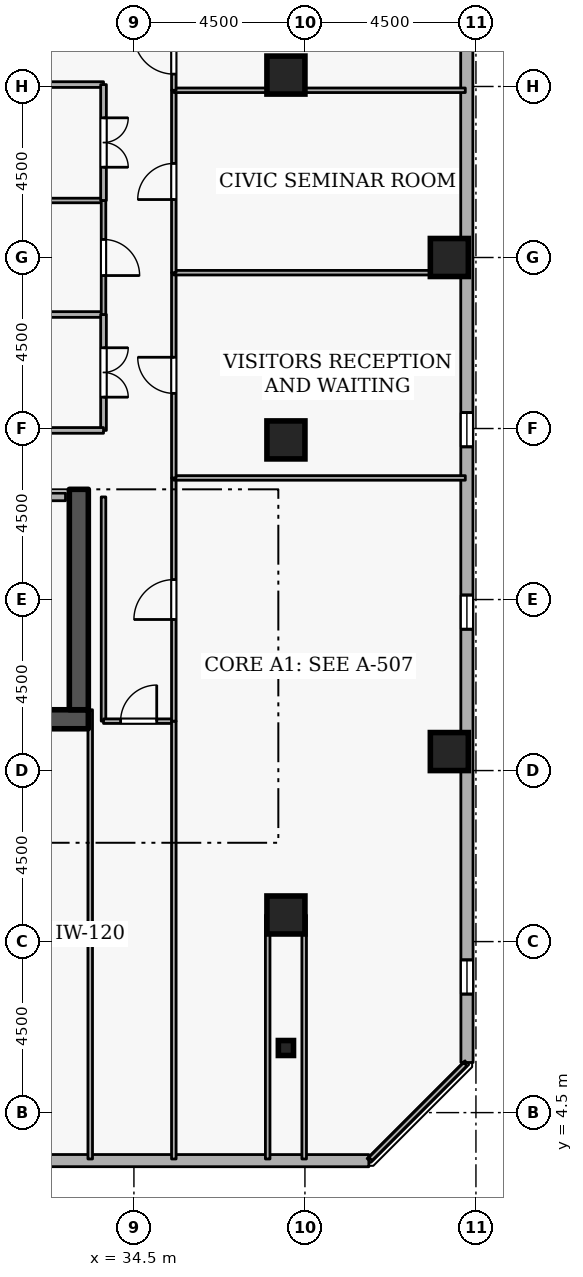
"""IFC4 building model, lengths in metres.
Left out: names, types, materials, properties, quantities, classifications, styles, units other than length and angle.
Written with IfcOpenShell. Run it as: python <this file> out.ifc"""

import sys

from ifc_helpers import new_model, si_unit, direction, frame, frame_2d, origin, origin_2d, place, context, subcontext, project, spatial, rectangle, i_section, extrude, element, fill, save


model = new_model("IFC4")
c1 = context("Model", 3, precision=1e-05, world=origin(), true_north=direction((0.0, 1.0)))
c2 = subcontext(c1, "Body", "Model", "MODEL_VIEW")
j1 = project(units=[si_unit("LENGTHUNIT", "METRE"), si_unit("PLANEANGLEUNIT", "RADIAN")], contexts=[c1])
p1 = place(None, origin())
s1 = spatial("IfcSite", under=j1, at=p1, CompositionType="ELEMENT")
p2 = place(p1, origin())
s2 = spatial("IfcBuilding", under=s1, at=p2, CompositionType="ELEMENT")
p3 = place(p2, frame((0.0, 0.0, 247.5)))
s3 = spatial("IfcBuildingStorey", under=s2, at=p3, CompositionType="ELEMENT", Elevation=247.5)
p4 = place(p3, frame((17.7, 14.85, 0.0), z_axis=(0.0, 0.0, 1.0), x_axis=(1.0, 0.0, 0.0)))
e1 = element("IfcWall", 1, at=p4, inside=s3, PredefinedType="SHEAR", context=c2, shape_type="SweptSolid", body=[
    extrude(rectangle(XDim=15.6, YDim=0.5, at=frame_2d((7.8, 0.0))), origin(), (0.0, 0.0, 1.0), 3.6),
])
p5 = place(p3, frame((33.05, 15.1, 0.0), z_axis=(0.0, 0.0, 1.0), x_axis=(0.0, 1.0, 0.0)))
e2 = element("IfcWall", 2, at=p5, inside=s3, PredefinedType="SHEAR", context=c2, shape_type="SweptSolid", body=[
    extrude(rectangle(XDim=5.8, YDim=0.5, at=frame_2d((2.9, 0.0))), origin(), (0.0, 0.0, 1.0), 3.6),
])
for number, where, z_axis, x_axis in (
    (3, (38.5, 9.7, 0.0), (0.0, 0.0, 1.0), (1.0, 0.0, 0.0)),
    (4, (42.8, 14.0, 0.0), (0.0, 0.0, 1.0), (1.0, 0.0, 0.0)),
    (5, (42.8, 27.0, 0.0), (0.0, 0.0, 1.0), (1.0, 0.0, 0.0)),
    (6, (38.5, 22.2, 0.0), (0.0, 0.0, 1.0), (1.0, 0.0, 0.0)),
    (7, (38.5, 31.8, 0.0), (0.0, 0.0, 1.0), (1.0, 0.0, 0.0)),
):
    element("IfcColumn", number, at=place(p3, frame(where, z_axis=z_axis, x_axis=x_axis)), inside=s3, PredefinedType="COLUMN", context=c2, shape_type="SweptSolid", body=[
        extrude(rectangle(XDim=1.0, YDim=1.0, at=origin_2d()), origin(), (0.0, 0.0, 1.0), 3.6),
    ])
p6 = place(p3, frame((38.5, 6.2, 0.0), z_axis=(0.0, 0.0, 1.0), x_axis=(1.0, 0.0, 0.0)))
e8 = element("IfcColumn", 8, at=p6, inside=s3, PredefinedType="COLUMN", context=c2, shape_type="SweptSolid", body=[
    extrude(i_section(OverallWidth=0.399, OverallDepth=0.394, WebThickness=0.023, FlangeThickness=0.037, FilletRadius=0.015, at=origin_2d()), origin(), (0.0, 0.0, 1.0), 3.6),
])
p7 = place(p3, frame((6.525, 3.243, 0.0), z_axis=(0.0, 0.0, 1.0), x_axis=(0.99999997701, -0.000214431216, 0.0)))
e9 = element("IfcWall", 9, at=p7, inside=s3, PredefinedType="STANDARD", context=c2, shape_type="SweptSolid", body=[
    extrude(rectangle(XDim=34.156, YDim=0.32, at=frame_2d((17.078, 0.0))), origin(), (0.0, 0.0, 1.0), 2.7),
])
p8 = place(p7, frame((1.8, 0.0, 0.72)))
e10 = element("IfcOpeningElement", 10, at=p8, cuts=e9, PredefinedType="OPENING", context=c2, shape_type="SweptSolid", body=[
    extrude(rectangle(XDim=0.9, YDim=1.75, at=frame_2d((0.45, 0.875))), frame((0.0, 0.17, 0.0), z_axis=(0.0, -1.0, 0.0), x_axis=(1.0, 0.0, 0.0)), (0.0, 0.0, 1.0), 0.34),
])
p9 = place(p7, frame((11.4, 0.0, 0.72)))
e11 = element("IfcOpeningElement", 11, at=p9, cuts=e9, PredefinedType="OPENING", context=c2, shape_type="SweptSolid", body=[
    extrude(rectangle(XDim=0.9, YDim=1.75, at=frame_2d((0.45, 0.875))), frame((0.0, 0.17, 0.0), z_axis=(0.0, -1.0, 0.0), x_axis=(1.0, 0.0, 0.0)), (0.0, 0.0, 1.0), 0.34),
])
p10 = place(p7, frame((16.2, 0.0, 0.72)))
e12 = element("IfcOpeningElement", 12, at=p10, cuts=e9, PredefinedType="OPENING", context=c2, shape_type="SweptSolid", body=[
    extrude(rectangle(XDim=0.9, YDim=1.75, at=frame_2d((0.45, 0.875))), frame((0.0, 0.17, 0.0), z_axis=(0.0, -1.0, 0.0), x_axis=(1.0, 0.0, 0.0)), (0.0, 0.0, 1.0), 0.34),
])
p11 = place(p7, frame((21.0, 0.0, 0.72)))
e13 = element("IfcOpeningElement", 13, at=p11, cuts=e9, PredefinedType="OPENING", context=c2, shape_type="SweptSolid", body=[
    extrude(rectangle(XDim=0.9, YDim=1.75, at=frame_2d((0.45, 0.875))), frame((0.0, 0.17, 0.0), z_axis=(0.0, -1.0, 0.0), x_axis=(1.0, 0.0, 0.0)), (0.0, 0.0, 1.0), 0.34),
])
p12 = place(p3, frame((43.265, 5.819, 0.0), z_axis=(0.0, 0.0, 1.0), x_axis=(-0.000214431216, 0.99999997701, 0.0)))
e14 = element("IfcWall", 14, at=p12, inside=s3, PredefinedType="STANDARD", context=c2, shape_type="SweptSolid", body=[
    extrude(rectangle(XDim=34.156, YDim=0.32, at=frame_2d((17.078, 0.0))), origin(), (0.0, 0.0, 1.0), 2.7),
])
p13 = place(p12, frame((1.8, 0.0, 0.72)))
e15 = element("IfcOpeningElement", 15, at=p13, cuts=e14, PredefinedType="OPENING", context=c2, shape_type="SweptSolid", body=[
    extrude(rectangle(XDim=0.9, YDim=1.75, at=frame_2d((0.45, 0.875))), frame((0.0, 0.17, 0.0), z_axis=(0.0, -1.0, 0.0), x_axis=(1.0, 0.0, 0.0)), (0.0, 0.0, 1.0), 0.34),
])
p14 = place(p12, frame((11.4, 0.0, 0.72)))
e16 = element("IfcOpeningElement", 16, at=p14, cuts=e14, PredefinedType="OPENING", context=c2, shape_type="SweptSolid", body=[
    extrude(rectangle(XDim=0.9, YDim=1.75, at=frame_2d((0.45, 0.875))), frame((0.0, 0.17, 0.0), z_axis=(0.0, -1.0, 0.0), x_axis=(1.0, 0.0, 0.0)), (0.0, 0.0, 1.0), 0.34),
])
p15 = place(p12, frame((16.2, 0.0, 0.72)))
e17 = element("IfcOpeningElement", 17, at=p15, cuts=e14, PredefinedType="OPENING", context=c2, shape_type="SweptSolid", body=[
    extrude(rectangle(XDim=0.9, YDim=1.75, at=frame_2d((0.45, 0.875))), frame((0.0, 0.17, 0.0), z_axis=(0.0, -1.0, 0.0), x_axis=(1.0, 0.0, 0.0)), (0.0, 0.0, 1.0), 0.34),
])
p16 = place(p12, frame((30.6, 0.0, 0.72)))
e18 = element("IfcOpeningElement", 18, at=p16, cuts=e14, PredefinedType="OPENING", context=c2, shape_type="SweptSolid", body=[
    extrude(rectangle(XDim=0.9, YDim=1.75, at=frame_2d((0.45, 0.875))), frame((0.0, 0.17, 0.0), z_axis=(0.0, -1.0, 0.0), x_axis=(1.0, 0.0, 0.0)), (0.0, 0.0, 1.0), 0.34),
])
p17 = place(p3, frame((30.5, 20.7, 0.0), z_axis=(0.0, 0.0, 1.0), x_axis=(1.0, 0.0, 0.0)))
e19 = element("IfcWall", 19, at=p17, inside=s3, PredefinedType="STANDARD", context=c2, shape_type="SweptSolid", body=[
    extrude(rectangle(XDim=2.2, YDim=0.2, at=frame_2d((1.1, 0.0))), origin(), (0.0, 0.0, 1.0), 3.34),
])
p18 = place(p17, frame((0.525, 0.0, 0.0)))
e20 = element("IfcOpeningElement", 20, at=p18, cuts=e19, PredefinedType="OPENING", context=c2, shape_type="SweptSolid", body=[
    extrude(rectangle(XDim=1.15, YDim=2.1, at=frame_2d((0.575, 1.05))), frame((0.0, 0.11, 0.0), z_axis=(0.0, -1.0, 0.0), x_axis=(1.0, 0.0, 0.0)), (0.0, 0.0, 1.0), 0.22),
])
p19 = place(p3, frame((33.7, 20.7, 0.0), z_axis=(0.0, 0.0, 1.0), x_axis=(0.0, -1.0, 0.0)))
e21 = element("IfcWall", 21, at=p19, inside=s3, PredefinedType="PARTITIONING", context=c2, shape_type="SweptSolid", body=[
    extrude(rectangle(XDim=5.9, YDim=0.12, at=frame_2d((2.95, 0.0))), origin(), (0.0, 0.0, 1.0), 3.34),
])
p20 = place(p3, frame((33.7, 14.8, 0.0), z_axis=(0.0, 0.0, 1.0), x_axis=(1.0, 0.0, 0.0)))
e22 = element("IfcWall", 22, at=p20, inside=s3, PredefinedType="PARTITIONING", context=c2, shape_type="SweptSolid", body=[
    extrude(rectangle(XDim=1.85, YDim=0.12, at=frame_2d((0.925, 0.0))), origin(), (0.0, 0.0, 1.0), 3.34),
])
p21 = place(p20, frame((0.45, 0.0, 0.0)))
e23 = element("IfcOpeningElement", 23, at=p21, cuts=e22, PredefinedType="OPENING", context=c2, shape_type="SweptSolid", body=[
    extrude(rectangle(XDim=0.95, YDim=2.1, at=frame_2d((0.475, 1.05))), frame((0.0, 0.07, 0.0), z_axis=(0.0, -1.0, 0.0), x_axis=(1.0, 0.0, 0.0)), (0.0, 0.0, 1.0), 0.14),
])
p22 = place(p3, frame((35.55, 14.8, 0.0), z_axis=(0.0, 0.0, 1.0), x_axis=(0.0, -1.0, 0.0)))
e24 = element("IfcWall", 24, at=p22, inside=s3, PredefinedType="PARTITIONING", context=c2, shape_type="SweptSolid", body=[
    extrude(rectangle(XDim=11.52, YDim=0.12, at=frame_2d((5.76, 0.0))), origin(), (0.0, 0.0, 1.0), 3.34),
])
p23 = place(p3, frame((33.35, 3.28, 0.0), z_axis=(0.0, 0.0, 1.0), x_axis=(0.0, 1.0, 0.0)))
e25 = element("IfcWall", 25, at=p23, inside=s3, PredefinedType="PARTITIONING", context=c2, shape_type="SweptSolid", body=[
    extrude(rectangle(XDim=11.82, YDim=0.12, at=frame_2d((5.91, 0.0))), origin(), (0.0, 0.0, 1.0), 2.545),
])
for number, where, z_axis, x_axis in (
    (26, (38.98, 3.28, 0.0), (0.0, 0.0, 1.0), (0.0, 1.0, 0.0)),
    (27, (38.02, 9.7, 0.0), (0.0, 0.0, 1.0), (0.0, -1.0, 0.0)),
):
    element("IfcWall", number, at=place(p3, frame(where, z_axis=z_axis, x_axis=x_axis)), inside=s3, PredefinedType="PARTITIONING", context=c2, shape_type="SweptSolid", body=[
        extrude(rectangle(XDim=6.42, YDim=0.12, at=frame_2d((3.21, 0.0))), origin(), (0.0, 0.0, 1.0), 3.34),
    ])
p24 = place(p3, frame((35.55, 14.8, 0.0), z_axis=(0.0, 0.0, 1.0), x_axis=(0.0, 1.0, 0.0)))
e28 = element("IfcWall", 28, at=p24, inside=s3, PredefinedType="PARTITIONING", context=c2, shape_type="SweptSolid", body=[
    extrude(rectangle(XDim=6.4, YDim=0.12, at=frame_2d((3.2, 0.0))), origin(), (0.0, 0.0, 1.0), 3.34),
])
p25 = place(p24, frame((2.675, 0.0, 0.0)))
e29 = element("IfcOpeningElement", 29, at=p25, cuts=e28, PredefinedType="OPENING", context=c2, shape_type="SweptSolid", body=[
    extrude(rectangle(XDim=1.05, YDim=2.1, at=frame_2d((0.525, 1.05))), frame((0.0, 0.07, 0.0), z_axis=(0.0, -1.0, 0.0), x_axis=(1.0, 0.0, 0.0)), (0.0, 0.0, 1.0), 0.14),
])
p26 = place(p3, frame((35.55, 21.2, 0.0), z_axis=(0.0, 0.0, 1.0), x_axis=(1.0, 0.0, 0.0)))
e30 = element("IfcWall", 30, at=p26, inside=s3, PredefinedType="PARTITIONING", context=c2, shape_type="SweptSolid", body=[
    extrude(rectangle(XDim=7.67, YDim=0.12, at=frame_2d((3.835, 0.0))), origin(), (0.0, 0.0, 1.0), 3.34),
])
p27 = place(p3, frame((43.22, 5.775, 0.0), z_axis=(0.0, 0.0, 1.0), x_axis=(-0.707106781187, -0.707106781187, 0.0)))
e31 = element("IfcWall", 31, at=p27, inside=s3, PredefinedType="PARTITIONING", context=c2, shape_type="SweptSolid", body=[
    extrude(rectangle(XDim=3.528, YDim=0.12, at=frame_2d((1.764, 0.0))), origin(), (0.0, 0.0, 1.0), 3.34),
])
p28 = place(p3, frame((35.55, 21.2, 0.0), z_axis=(0.0, 0.0, 1.0), x_axis=(0.0, 1.0, 0.0)))
e32 = element("IfcWall", 32, at=p28, inside=s3, PredefinedType="PARTITIONING", context=c2, shape_type="SweptSolid", body=[
    extrude(rectangle(XDim=5.4, YDim=0.12, at=frame_2d((2.7, 0.0))), origin(), (0.0, 0.0, 1.0), 3.34),
])
p29 = place(p28, frame((2.225, 0.0, 0.0)))
e33 = element("IfcOpeningElement", 33, at=p29, cuts=e32, PredefinedType="OPENING", context=c2, shape_type="SweptSolid", body=[
    extrude(rectangle(XDim=0.95, YDim=2.1, at=frame_2d((0.475, 1.05))), frame((0.0, 0.07, 0.0), z_axis=(0.0, -1.0, 0.0), x_axis=(1.0, 0.0, 0.0)), (0.0, 0.0, 1.0), 0.14),
])
p30 = place(p3, frame((35.55, 26.6, 0.0), z_axis=(0.0, 0.0, 1.0), x_axis=(1.0, 0.0, 0.0)))
e34 = element("IfcWall", 34, at=p30, inside=s3, PredefinedType="PARTITIONING", context=c2, shape_type="SweptSolid", body=[
    extrude(rectangle(XDim=7.25, YDim=0.12, at=frame_2d((3.625, 0.0))), origin(), (0.0, 0.0, 1.0), 3.34),
])
p31 = place(p3, frame((35.55, 26.6, 0.0), z_axis=(0.0, 0.0, 1.0), x_axis=(0.0, 1.0, 0.0)))
e35 = element("IfcWall", 35, at=p31, inside=s3, PredefinedType="PARTITIONING", context=c2, shape_type="SweptSolid", body=[
    extrude(rectangle(XDim=4.8, YDim=0.12, at=frame_2d((2.4, 0.0))), origin(), (0.0, 0.0, 1.0), 3.34),
])
p32 = place(p31, frame((1.925, 0.0, 0.0)))
e36 = element("IfcOpeningElement", 36, at=p32, cuts=e35, PredefinedType="OPENING", context=c2, shape_type="SweptSolid", body=[
    extrude(rectangle(XDim=0.95, YDim=2.1, at=frame_2d((0.475, 1.05))), frame((0.0, 0.07, 0.0), z_axis=(0.0, -1.0, 0.0), x_axis=(1.0, 0.0, 0.0)), (0.0, 0.0, 1.0), 0.14),
])
p33 = place(p3, frame((35.55, 31.4, 0.0), z_axis=(0.0, 0.0, 1.0), x_axis=(1.0, 0.0, 0.0)))
e37 = element("IfcWall", 37, at=p33, inside=s3, PredefinedType="PARTITIONING", context=c2, shape_type="SweptSolid", body=[
    extrude(rectangle(XDim=7.67, YDim=0.12, at=frame_2d((3.835, 0.0))), origin(), (0.0, 0.0, 1.0), 3.34),
])
p34 = place(p3, frame((35.55, 31.4, 0.0), z_axis=(0.0, 0.0, 1.0), x_axis=(0.0, 1.0, 0.0)))
e38 = element("IfcWall", 38, at=p34, inside=s3, PredefinedType="PARTITIONING", context=c2, shape_type="SweptSolid", body=[
    extrude(rectangle(XDim=1.9, YDim=0.12, at=frame_2d((0.95, 0.0))), origin(), (0.0, 0.0, 1.0), 3.34),
])
p35 = place(p34, frame((0.425, 0.0, 0.0)))
e39 = element("IfcOpeningElement", 39, at=p35, cuts=e38, PredefinedType="OPENING", context=c2, shape_type="SweptSolid", body=[
    extrude(rectangle(XDim=1.05, YDim=2.1, at=frame_2d((0.525, 1.05))), frame((0.0, 0.07, 0.0), z_axis=(0.0, -1.0, 0.0), x_axis=(1.0, 0.0, 0.0)), (0.0, 0.0, 1.0), 0.14),
])
p36 = place(p3, frame((30.7, 25.5, 0.0), z_axis=(0.0, 0.0, 1.0), x_axis=(1.0, 0.0, 0.0)))
e40 = element("IfcWall", 40, at=p36, inside=s3, PredefinedType="PARTITIONING", context=c2, shape_type="SweptSolid", body=[
    extrude(rectangle(XDim=3.0, YDim=0.15, at=frame_2d((1.5, 0.0))), origin(), (0.0, 0.0, 1.0), 3.34),
])
p37 = place(p3, frame((33.7, 25.5, 0.0), z_axis=(0.0, 0.0, 1.0), x_axis=(0.0, -1.0, 0.0)))
e41 = element("IfcWall", 41, at=p37, inside=s3, PredefinedType="PARTITIONING", context=c2, shape_type="SweptSolid", body=[
    extrude(rectangle(XDim=3.05, YDim=0.15, at=frame_2d((1.525, 0.0))), origin(), (0.0, 0.0, 1.0), 3.34),
])
p38 = place(p37, frame((0.875, 0.0, 0.0)))
e42 = element("IfcOpeningElement", 42, at=p38, cuts=e41, PredefinedType="OPENING", context=c2, shape_type="SweptSolid", body=[
    extrude(rectangle(XDim=1.3, YDim=2.12, at=frame_2d((0.65, 1.06))), frame((0.0, 0.085, 0.0), z_axis=(0.0, -1.0, 0.0), x_axis=(1.0, 0.0, 0.0)), (0.0, 0.0, 1.0), 0.17),
])
p39 = place(p3, frame((33.7, 22.45, 0.0), z_axis=(0.0, 0.0, 1.0), x_axis=(-1.0, 0.0, 0.0)))
e43 = element("IfcWall", 43, at=p39, inside=s3, PredefinedType="PARTITIONING", context=c2, shape_type="SweptSolid", body=[
    extrude(rectangle(XDim=3.0, YDim=0.15, at=frame_2d((1.5, 0.0))), origin(), (0.0, 0.0, 1.0), 3.34),
])
p40 = place(p3, frame((30.7, 28.5, 0.0), z_axis=(0.0, 0.0, 1.0), x_axis=(1.0, 0.0, 0.0)))
e44 = element("IfcWall", 44, at=p40, inside=s3, PredefinedType="PARTITIONING", context=c2, shape_type="SweptSolid", body=[
    extrude(rectangle(XDim=3.0, YDim=0.12, at=frame_2d((1.5, 0.0))), origin(), (0.0, 0.0, 1.0), 3.34),
])
p41 = place(p3, frame((33.7, 28.5, 0.0), z_axis=(0.0, 0.0, 1.0), x_axis=(0.0, -1.0, 0.0)))
e45 = element("IfcWall", 45, at=p41, inside=s3, PredefinedType="PARTITIONING", context=c2, shape_type="SweptSolid", body=[
    extrude(rectangle(XDim=3.0, YDim=0.12, at=frame_2d((1.5, 0.0))), origin(), (0.0, 0.0, 1.0), 3.34),
])
p42 = place(p41, frame((1.025, 0.0, 0.0)))
e46 = element("IfcOpeningElement", 46, at=p42, cuts=e45, PredefinedType="OPENING", context=c2, shape_type="SweptSolid", body=[
    extrude(rectangle(XDim=0.95, YDim=2.1, at=frame_2d((0.475, 1.05))), frame((0.0, 0.07, 0.0), z_axis=(0.0, -1.0, 0.0), x_axis=(1.0, 0.0, 0.0)), (0.0, 0.0, 1.0), 0.14),
])
p43 = place(p3, frame((30.7, 31.55, 0.0), z_axis=(0.0, 0.0, 1.0), x_axis=(1.0, 0.0, 0.0)))
e47 = element("IfcWall", 47, at=p43, inside=s3, PredefinedType="PARTITIONING", context=c2, shape_type="SweptSolid", body=[
    extrude(rectangle(XDim=3.0, YDim=0.15, at=frame_2d((1.5, 0.0))), origin(), (0.0, 0.0, 1.0), 3.34),
])
p44 = place(p3, frame((33.7, 31.55, 0.0), z_axis=(0.0, 0.0, 1.0), x_axis=(0.0, -1.0, 0.0)))
e48 = element("IfcWall", 48, at=p44, inside=s3, PredefinedType="PARTITIONING", context=c2, shape_type="SweptSolid", body=[
    extrude(rectangle(XDim=3.05, YDim=0.15, at=frame_2d((1.525, 0.0))), origin(), (0.0, 0.0, 1.0), 3.34),
])
p45 = place(p44, frame((0.875, 0.0, 0.0)))
e49 = element("IfcOpeningElement", 49, at=p45, cuts=e48, PredefinedType="OPENING", context=c2, shape_type="SweptSolid", body=[
    extrude(rectangle(XDim=1.3, YDim=2.12, at=frame_2d((0.65, 1.06))), frame((0.0, 0.085, 0.0), z_axis=(0.0, -1.0, 0.0), x_axis=(1.0, 0.0, 0.0)), (0.0, 0.0, 1.0), 0.17),
])
p46 = place(p13, origin())
e50 = element("IfcWindow", 50, at=p46, inside=s3, PartitioningType="SINGLE_PANEL", PredefinedType="WINDOW", context=c2, shape_type="SweptSolid", body=[
    extrude(rectangle(XDim=0.9, YDim=1.75, at=frame_2d((0.45, 0.875))), frame((0.0, 0.03, 0.0), z_axis=(0.0, -1.0, 0.0), x_axis=(1.0, 0.0, 0.0)), (0.0, 0.0, 1.0), 0.06),
])
fill(e15, e50)
p47 = place(p14, origin())
e51 = element("IfcWindow", 51, at=p47, inside=s3, PartitioningType="SINGLE_PANEL", PredefinedType="WINDOW", context=c2, shape_type="SweptSolid", body=[
    extrude(rectangle(XDim=0.9, YDim=1.75, at=frame_2d((0.45, 0.875))), frame((0.0, 0.03, 0.0), z_axis=(0.0, -1.0, 0.0), x_axis=(1.0, 0.0, 0.0)), (0.0, 0.0, 1.0), 0.06),
])
fill(e16, e51)
p48 = place(p15, origin())
e52 = element("IfcWindow", 52, at=p48, inside=s3, PartitioningType="SINGLE_PANEL", PredefinedType="WINDOW", context=c2, shape_type="SweptSolid", body=[
    extrude(rectangle(XDim=0.9, YDim=1.75, at=frame_2d((0.45, 0.875))), frame((0.0, 0.03, 0.0), z_axis=(0.0, -1.0, 0.0), x_axis=(1.0, 0.0, 0.0)), (0.0, 0.0, 1.0), 0.06),
])
fill(e17, e52)
p49 = place(p21, origin())
e53 = element("IfcDoor", 53, at=p49, inside=s3, OperationType="SINGLE_SWING_RIGHT", PredefinedType="DOOR", context=c2, shape_type="SweptSolid", body=[
    extrude(rectangle(XDim=0.95, YDim=2.1, at=frame_2d((0.475, 1.05))), frame((0.0, 0.025, 0.0), z_axis=(0.0, -1.0, 0.0), x_axis=(1.0, 0.0, 0.0)), (0.0, 0.0, 1.0), 0.05),
])
fill(e23, e53)
p50 = place(p25, origin())
e54 = element("IfcDoor", 54, at=p50, inside=s3, OperationType="SINGLE_SWING_LEFT", PredefinedType="DOOR", context=c2, shape_type="SweptSolid", body=[
    extrude(rectangle(XDim=1.05, YDim=2.1, at=frame_2d((0.525, 1.05))), frame((0.0, 0.025, 0.0), z_axis=(0.0, -1.0, 0.0), x_axis=(1.0, 0.0, 0.0)), (0.0, 0.0, 1.0), 0.05),
])
fill(e29, e54)
p51 = place(p29, origin())
e55 = element("IfcDoor", 55, at=p51, inside=s3, OperationType="SINGLE_SWING_RIGHT", PredefinedType="DOOR", context=c2, shape_type="SweptSolid", body=[
    extrude(rectangle(XDim=0.95, YDim=2.1, at=frame_2d((0.475, 1.05))), frame((0.0, 0.025, 0.0), z_axis=(0.0, -1.0, 0.0), x_axis=(1.0, 0.0, 0.0)), (0.0, 0.0, 1.0), 0.05),
])
fill(e33, e55)
p52 = place(p32, origin())
e56 = element("IfcDoor", 56, at=p52, inside=s3, OperationType="SINGLE_SWING_LEFT", PredefinedType="DOOR", context=c2, shape_type="SweptSolid", body=[
    extrude(rectangle(XDim=0.95, YDim=2.1, at=frame_2d((0.475, 1.05))), frame((0.0, 0.025, 0.0), z_axis=(0.0, -1.0, 0.0), x_axis=(1.0, 0.0, 0.0)), (0.0, 0.0, 1.0), 0.05),
])
fill(e36, e56)
p53 = place(p35, origin())
e57 = element("IfcDoor", 57, at=p53, inside=s3, OperationType="SINGLE_SWING_RIGHT", PredefinedType="DOOR", context=c2, shape_type="SweptSolid", body=[
    extrude(rectangle(XDim=1.05, YDim=2.1, at=frame_2d((0.525, 1.05))), frame((0.0, 0.025, 0.0), z_axis=(0.0, -1.0, 0.0), x_axis=(1.0, 0.0, 0.0)), (0.0, 0.0, 1.0), 0.05),
])
fill(e39, e57)
p54 = place(p38, origin())
e58 = element("IfcDoor", 58, at=p54, inside=s3, OperationType="DOUBLE_DOOR_SINGLE_SWING", PredefinedType="DOOR", context=c2, shape_type="SweptSolid", body=[
    extrude(rectangle(XDim=1.3, YDim=2.12, at=frame_2d((0.65, 1.06))), frame((0.0, 0.025, 0.0), z_axis=(0.0, -1.0, 0.0), x_axis=(1.0, 0.0, 0.0)), (0.0, 0.0, 1.0), 0.05),
])
fill(e42, e58)
p55 = place(p42, origin())
e59 = element("IfcDoor", 59, at=p55, inside=s3, OperationType="SINGLE_SWING_RIGHT", PredefinedType="DOOR", context=c2, shape_type="SweptSolid", body=[
    extrude(rectangle(XDim=0.95, YDim=2.1, at=frame_2d((0.475, 1.05))), frame((0.0, 0.025, 0.0), z_axis=(0.0, -1.0, 0.0), x_axis=(1.0, 0.0, 0.0)), (0.0, 0.0, 1.0), 0.05),
])
fill(e46, e59)
p56 = place(p45, origin())
e60 = element("IfcDoor", 60, at=p56, inside=s3, OperationType="DOUBLE_DOOR_SINGLE_SWING", PredefinedType="DOOR", context=c2, shape_type="SweptSolid", body=[
    extrude(rectangle(XDim=1.3, YDim=2.12, at=frame_2d((0.65, 1.06))), frame((0.0, 0.025, 0.0), z_axis=(0.0, -1.0, 0.0), x_axis=(1.0, 0.0, 0.0)), (0.0, 0.0, 1.0), 0.05),
])
fill(e49, e60)
save(model, sys.argv[1])
